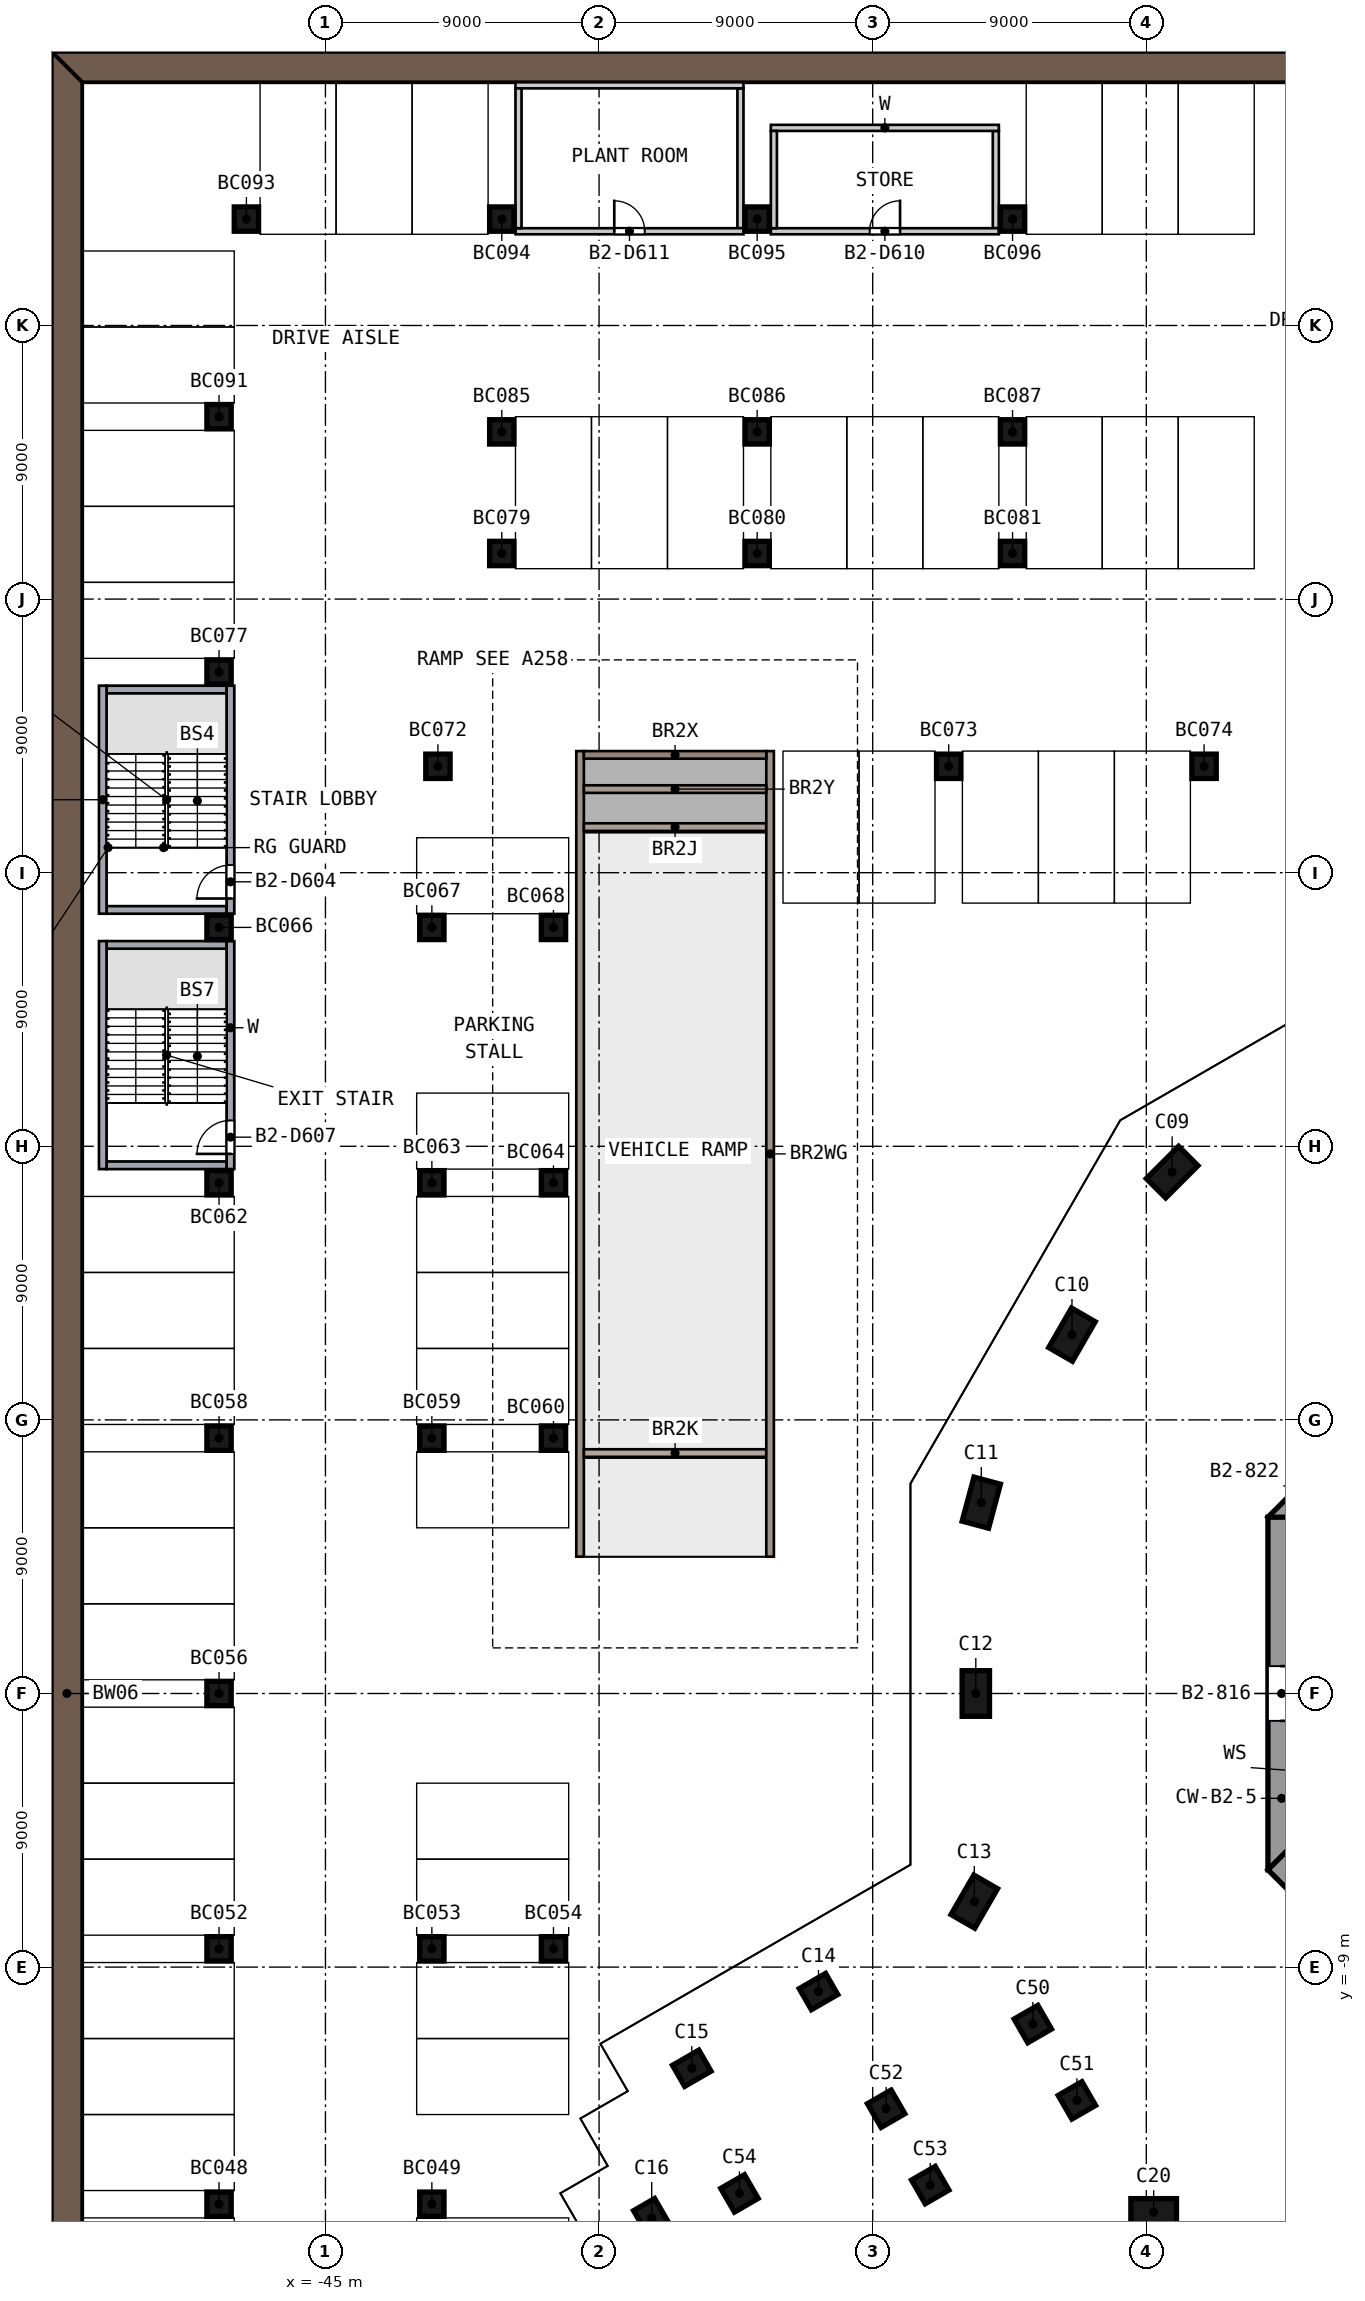
"""IFC4 building model, lengths in metres.
Left out: names, types, materials, properties, quantities, classifications, styles, units other than length and angle.
Written with IfcOpenShell. Run it as: python <this file> out.ifc"""

import sys

from ifc_helpers import new_model, si_unit, direction, frame, frame_2d, origin, origin_2d, place, context, subcontext, project, spatial, polyline, rectangle, outline, extrude, element, fill, save


model = new_model("IFC4")
c1 = context("Model", 3, precision=1e-05, world=origin(), true_north=direction((0.0, 1.0)))
c2 = subcontext(c1, "Body", "Model", "MODEL_VIEW")
j1 = project(units=[si_unit("LENGTHUNIT", "METRE"), si_unit("PLANEANGLEUNIT", "RADIAN")], contexts=[c1])
p1 = place(None, origin())
s1 = spatial("IfcSite", under=j1, at=p1, CompositionType="ELEMENT")
p2 = place(p1, origin())
s2 = spatial("IfcBuilding", under=s1, at=p2, CompositionType="ELEMENT")
p3 = place(p2, frame((0.0, 0.0, -7.8)))
s3 = spatial("IfcBuildingStorey", under=s2, at=p3, CompositionType="ELEMENT", Elevation=-7.8)
for number, where, z_axis, x_axis in (
    (1, (-17.151, 17.151, 0.0), (0.0, 0.0, 1.0), (0.707, 0.707, 0.0)),
    (2, (-20.445, 11.804, 0.0), (0.0, 0.0, 1.0), (-0.5, -0.866, 0.0)),
    (3, (-23.428, 6.278, 0.0), (0.0, 0.0, 1.0), (0.259, 0.966, 0.0)),
    (4, (-23.608, 0.0, 0.0), (0.0, 0.0, 1.0), (0.0, -1.0, 0.0)),
    (5, (-23.658, -6.846, 0.0), (0.0, 0.0, 1.0), (0.5, 0.866, 0.0)),
):
    element("IfcColumn", number, at=place(p3, frame(where, z_axis=z_axis, x_axis=x_axis)), inside=s3, PredefinedType="COLUMN", context=c2, shape_type="SweptSolid", body=[
        extrude(rectangle(XDim=1.5, YDim=0.9, at=origin_2d()), origin(), (0.0, 0.0, 1.0), 3.45),
    ])
for number, where, z_axis, x_axis in (
    (6, (-28.783, -9.805, 0.0), (0.0, 0.0, 1.0), (-0.866, -0.5, 0.0)),
    (7, (-32.951, -12.327, 0.0), (0.0, 0.0, 1.0), (-0.866, -0.5, 0.0)),
    (8, (-34.269, -17.245, 0.0), (0.0, 0.0, 1.0), (0.5, -0.866, 0.0)),
):
    element("IfcColumn", number, at=place(p3, frame(where, z_axis=z_axis, x_axis=x_axis)), inside=s3, PredefinedType="COLUMN", context=c2, shape_type="SweptSolid", body=[
        extrude(rectangle(XDim=1.0, YDim=0.8, at=origin_2d()), origin(), (0.0, 0.0, 1.0), 3.45),
    ])
p4 = place(p3, frame((-17.758, -17.065, 0.0), z_axis=(0.0, 0.0, 1.0), x_axis=(-1.0, 0.0, 0.0)))
e9 = element("IfcColumn", 9, at=p4, inside=s3, PredefinedType="COLUMN", context=c2, shape_type="SweptSolid", body=[
    extrude(rectangle(XDim=1.5, YDim=0.9, at=origin_2d()), origin(), (0.0, 0.0, 1.0), 3.45),
])
for number, where, z_axis, x_axis in (
    (10, (-21.733, -10.873, 0.0), (0.0, 0.0, 1.0), (-0.866, -0.5, 0.0)),
    (11, (-20.283, -13.385, 0.0), (0.0, 0.0, 1.0), (-0.866, -0.5, 0.0)),
    (12, (-26.558, -13.659, 0.0), (0.0, 0.0, 1.0), (-0.866, -0.5, 0.0)),
    (13, (-25.108, -16.17, 0.0), (0.0, 0.0, 1.0), (-0.866, -0.5, 0.0)),
    (14, (-31.382, -16.444, 0.0), (0.0, 0.0, 1.0), (-0.866, -0.5, 0.0)),
):
    element("IfcColumn", number, at=place(p3, frame(where, z_axis=z_axis, x_axis=x_axis)), inside=s3, PredefinedType="COLUMN", context=c2, shape_type="SweptSolid", body=[
        extrude(rectangle(XDim=0.9, YDim=0.9, at=origin_2d()), origin(), (0.0, 0.0, 1.0), 3.45),
    ])
p5 = place(p3, frame((-5.481, 13.682, 0.0), z_axis=(0.0, 0.0, 1.0), x_axis=(-0.707106781, -0.707106781, 0.0)))
e15 = element("IfcWall", 15, at=p5, inside=s3, PredefinedType="SHEAR", context=c2, shape_type="SweptSolid", body=[
    extrude(rectangle(XDim=11.598, YDim=0.9, at=frame_2d((5.799, 0.0))), origin(), (0.0, 0.0, 1.0), 3.9),
])
p6 = place(p3, frame((-13.55, 5.799, 0.0), z_axis=(0.0, 0.0, 1.0), x_axis=(0.0, -1.0, 0.0)))
e16 = element("IfcWall", 16, at=p6, inside=s3, PredefinedType="SHEAR", context=c2, shape_type="SweptSolid", body=[
    extrude(rectangle(XDim=11.598, YDim=0.9, at=frame_2d((5.799, 0.0))), origin(), (0.0, 0.0, 1.0), 3.9),
])
p7 = place(p6, frame((4.899, 0.0, 0.0)))
e17 = element("IfcOpeningElement", 17, at=p7, cuts=e16, PredefinedType="OPENING", context=c2, shape_type="SweptSolid", body=[
    extrude(rectangle(XDim=1.8, YDim=2.1, at=frame_2d((0.9, 1.05))), frame((0.0, 0.46, 0.0), z_axis=(0.0, -1.0, 0.0), x_axis=(1.0, 0.0, 0.0)), (0.0, 0.0, 1.0), 0.92),
])
p8 = place(p3, frame((-13.682, -5.481, 0.0), z_axis=(0.0, 0.0, 1.0), x_axis=(0.707106781, -0.707106781, 0.0)))
e18 = element("IfcWall", 18, at=p8, inside=s3, PredefinedType="SHEAR", context=c2, shape_type="SweptSolid", body=[
    extrude(rectangle(XDim=11.598, YDim=0.9, at=frame_2d((5.799, 0.0))), origin(), (0.0, 0.0, 1.0), 3.9),
])
p9 = place(p3, origin())
e19 = element("IfcWall", 19, at=p9, inside=s3, PredefinedType="SOLIDWALL", context=c2, shape_type="SweptSolid", body=[
    extrude(outline(polyline([(54.0, 54.0), (-54.0, 54.0), (-53.0, 53.0), (53.0, 53.0), (54.0, 54.0)])), origin(), (0.0, 0.0, 1.0), 3.9),
])
p10 = place(p3, origin())
e20 = element("IfcWall", 20, at=p10, inside=s3, PredefinedType="SOLIDWALL", context=c2, shape_type="SweptSolid", body=[
    extrude(outline(polyline([(-54.0, 54.0), (-54.0, -54.0), (-53.0, -53.0), (-53.0, 53.0), (-54.0, 54.0)])), origin(), (0.0, 0.0, 1.0), 3.9),
])
for number, where, z_axis, x_axis in (
    (21, (-48.5, -16.8, 0.0), (0.0, 0.0, 1.0), (1.0, 0.0, 0.0)),
    (22, (-41.5, -16.8, 0.0), (0.0, 0.0, 1.0), (1.0, 0.0, 0.0)),
    (23, (-48.5, -8.4, 0.0), (0.0, 0.0, 1.0), (1.0, 0.0, 0.0)),
    (24, (-41.5, -8.4, 0.0), (0.0, 0.0, 1.0), (1.0, 0.0, 0.0)),
    (25, (-37.5, -8.4, 0.0), (0.0, 0.0, 1.0), (1.0, 0.0, 0.0)),
    (26, (-48.5, 0.0, 0.0), (0.0, 0.0, 1.0), (1.0, 0.0, 0.0)),
    (27, (-48.5, 8.4, 0.0), (0.0, 0.0, 1.0), (1.0, 0.0, 0.0)),
    (28, (-41.5, 8.4, 0.0), (0.0, 0.0, 1.0), (1.0, 0.0, 0.0)),
    (29, (-37.5, 8.4, 0.0), (0.0, 0.0, 1.0), (1.0, 0.0, 0.0)),
    (30, (-48.5, 16.8, 0.0), (0.0, 0.0, 1.0), (1.0, 0.0, 0.0)),
    (31, (-41.5, 16.8, 0.0), (0.0, 0.0, 1.0), (1.0, 0.0, 0.0)),
    (32, (-37.5, 16.8, 0.0), (0.0, 0.0, 1.0), (1.0, 0.0, 0.0)),
    (33, (-48.5, 25.2, 0.0), (0.0, 0.0, 1.0), (1.0, 0.0, 0.0)),
    (34, (-41.5, 25.2, 0.0), (0.0, 0.0, 1.0), (1.0, 0.0, 0.0)),
    (35, (-37.5, 25.2, 0.0), (0.0, 0.0, 1.0), (1.0, 0.0, 0.0)),
    (36, (-41.3, 30.5, 0.0), (0.0, 0.0, 1.0), (1.0, 0.0, 0.0)),
    (37, (-24.5, 30.5, 0.0), (0.0, 0.0, 1.0), (1.0, 0.0, 0.0)),
    (38, (-16.1, 30.5, 0.0), (0.0, 0.0, 1.0), (1.0, 0.0, 0.0)),
    (39, (-48.5, 33.6, 0.0), (0.0, 0.0, 1.0), (1.0, 0.0, 0.0)),
    (40, (-39.2, 37.5, 0.0), (0.0, 0.0, 1.0), (1.0, 0.0, 0.0)),
    (41, (-30.8, 37.5, 0.0), (0.0, 0.0, 1.0), (1.0, 0.0, 0.0)),
    (42, (-22.4, 37.5, 0.0), (0.0, 0.0, 1.0), (1.0, 0.0, 0.0)),
    (43, (-39.2, 41.5, 0.0), (0.0, 0.0, 1.0), (1.0, 0.0, 0.0)),
    (44, (-30.8, 41.5, 0.0), (0.0, 0.0, 1.0), (1.0, 0.0, 0.0)),
    (45, (-22.4, 41.5, 0.0), (0.0, 0.0, 1.0), (1.0, 0.0, 0.0)),
    (46, (-48.5, 42.0, 0.0), (0.0, 0.0, 1.0), (1.0, 0.0, 0.0)),
    (47, (-47.6, 48.5, 0.0), (0.0, 0.0, 1.0), (1.0, 0.0, 0.0)),
    (48, (-39.2, 48.5, 0.0), (0.0, 0.0, 1.0), (1.0, 0.0, 0.0)),
    (49, (-30.8, 48.5, 0.0), (0.0, 0.0, 1.0), (1.0, 0.0, 0.0)),
    (50, (-22.4, 48.5, 0.0), (0.0, 0.0, 1.0), (1.0, 0.0, 0.0)),
):
    element("IfcColumn", number, at=place(p3, frame(where, z_axis=z_axis, x_axis=x_axis)), inside=s3, PredefinedType="COLUMN", context=c2, shape_type="SweptSolid", body=[
        extrude(rectangle(XDim=0.8, YDim=0.8, at=origin_2d()), origin(), (0.0, 0.0, 1.0), 3.9),
    ])
for number, where, z_axis, x_axis in (
    (51, (-30.375, 31.0, 0.0), (0.0, 0.0, 1.0), (0.0, -1.0, 0.0)),
    (52, (-36.625, 31.0, 0.0), (0.0, 0.0, 1.0), (0.0, -1.0, 0.0)),
):
    element("IfcWall", number, at=place(p3, frame(where, z_axis=z_axis, x_axis=x_axis)), inside=s3, PredefinedType="SOLIDWALL", context=c2, shape_type="SweptSolid", body=[
        extrude(rectangle(XDim=26.5, YDim=0.25, at=frame_2d((13.25, 0.0))), origin(), (0.0, 0.0, 1.0), 5.02),
    ])
p11 = place(p3, frame((-30.5, 30.875, 0.0), z_axis=(0.0, 0.0, 1.0), x_axis=(-1.0, 0.0, 0.0)))
e53 = element("IfcWall", 53, at=p11, inside=s3, PredefinedType="SOLIDWALL", context=c2, shape_type="SweptSolid", body=[
    extrude(rectangle(XDim=6.0, YDim=0.25, at=frame_2d((3.0, 0.0))), origin(), (0.0, 0.0, 1.0), 3.55),
])
p12 = place(p3, frame((-30.5, 28.5, 0.0), z_axis=(0.0, 0.0, 1.0), x_axis=(-1.0, 0.0, 0.0)))
e54 = element("IfcWall", 54, at=p12, inside=s3, PredefinedType="SOLIDWALL", context=c2, shape_type="SweptSolid", body=[
    extrude(rectangle(XDim=6.0, YDim=0.25, at=frame_2d((3.0, 0.0))), origin(), (0.0, 0.0, 1.0), 3.734),
])
p13 = place(p3, frame((-30.5, 7.909, 0.0), z_axis=(0.0, 0.0, 1.0), x_axis=(-1.0, 0.0, 0.0)))
e55 = element("IfcWall", 55, at=p13, inside=s3, PredefinedType="SOLIDWALL", context=c2, shape_type="SweptSolid", body=[
    extrude(rectangle(XDim=6.0, YDim=0.25, at=frame_2d((3.0, 0.0))), origin(), (0.0, 0.0, 1.0), 0.395),
])
p14 = place(p3, frame((-30.5, 29.75, 0.0), z_axis=(0.0, 0.0, 1.0), x_axis=(-1.0, 0.0, 0.0)))
e56 = element("IfcWall", 56, at=p14, inside=s3, PredefinedType="SOLIDWALL", context=c2, shape_type="SweptSolid", body=[
    extrude(rectangle(XDim=6.0, YDim=0.25, at=frame_2d((3.0, 0.0))), origin(), (0.0, 0.0, 1.0), 3.471),
])
p15 = place(p3, frame((-52.325, 25.65, 0.0), z_axis=(0.0, 0.0, 1.0), x_axis=(0.0, 1.0, 0.0)))
e57 = element("IfcWall", 57, at=p15, inside=s3, PredefinedType="SOLIDWALL", context=c2, shape_type="SweptSolid", body=[
    extrude(rectangle(XDim=7.5, YDim=0.25, at=frame_2d((3.75, 0.0))), origin(), (0.0, 0.0, 1.0), 3.9),
])
p16 = place(p3, frame((-48.125, 25.65, 0.0), z_axis=(0.0, 0.0, 1.0), x_axis=(0.0, 1.0, 0.0)))
e58 = element("IfcWall", 58, at=p16, inside=s3, PredefinedType="SOLIDWALL", context=c2, shape_type="SweptSolid", body=[
    extrude(rectangle(XDim=7.5, YDim=0.25, at=frame_2d((3.75, 0.0))), origin(), (0.0, 0.0, 1.0), 3.9),
])
p17 = place(p16, frame((0.5, 0.0, 0.0)))
e59 = element("IfcOpeningElement", 59, at=p17, cuts=e58, PredefinedType="OPENING", context=c2, shape_type="SweptSolid", body=[
    extrude(rectangle(XDim=1.1, YDim=2.1, at=frame_2d((0.55, 1.05))), frame((0.0, 0.135, 0.0), z_axis=(0.0, -1.0, 0.0), x_axis=(1.0, 0.0, 0.0)), (0.0, 0.0, 1.0), 0.27),
])
for number, where, z_axis, x_axis in (
    (60, (-48.25, 25.775, 0.0), (0.0, 0.0, 1.0), (-1.0, 0.0, 0.0)),
    (61, (-48.25, 33.025, 0.0), (0.0, 0.0, 1.0), (-1.0, 0.0, 0.0)),
):
    element("IfcWall", number, at=place(p3, frame(where, z_axis=z_axis, x_axis=x_axis)), inside=s3, PredefinedType="SOLIDWALL", context=c2, shape_type="SweptSolid", body=[
        extrude(rectangle(XDim=3.95, YDim=0.25, at=frame_2d((1.975, 0.0))), origin(), (0.0, 0.0, 1.0), 3.9),
    ])
p18 = place(p3, frame((-52.325, 17.25, 0.0), z_axis=(0.0, 0.0, 1.0), x_axis=(0.0, 1.0, 0.0)))
e62 = element("IfcWall", 62, at=p18, inside=s3, PredefinedType="SOLIDWALL", context=c2, shape_type="SweptSolid", body=[
    extrude(rectangle(XDim=7.5, YDim=0.25, at=frame_2d((3.75, 0.0))), origin(), (0.0, 0.0, 1.0), 3.9),
])
p19 = place(p3, frame((-48.125, 17.25, 0.0), z_axis=(0.0, 0.0, 1.0), x_axis=(0.0, 1.0, 0.0)))
e63 = element("IfcWall", 63, at=p19, inside=s3, PredefinedType="SOLIDWALL", context=c2, shape_type="SweptSolid", body=[
    extrude(rectangle(XDim=7.5, YDim=0.25, at=frame_2d((3.75, 0.0))), origin(), (0.0, 0.0, 1.0), 3.9),
])
p20 = place(p19, frame((0.5, 0.0, 0.0)))
e64 = element("IfcOpeningElement", 64, at=p20, cuts=e63, PredefinedType="OPENING", context=c2, shape_type="SweptSolid", body=[
    extrude(rectangle(XDim=1.1, YDim=2.1, at=frame_2d((0.55, 1.05))), frame((0.0, 0.135, 0.0), z_axis=(0.0, -1.0, 0.0), x_axis=(1.0, 0.0, 0.0)), (0.0, 0.0, 1.0), 0.27),
])
for number, where, z_axis, x_axis in (
    (65, (-48.25, 17.375, 0.0), (0.0, 0.0, 1.0), (-1.0, 0.0, 0.0)),
    (66, (-48.25, 24.625, 0.0), (0.0, 0.0, 1.0), (-1.0, 0.0, 0.0)),
):
    element("IfcWall", number, at=place(p3, frame(where, z_axis=z_axis, x_axis=x_axis)), inside=s3, PredefinedType="SOLIDWALL", context=c2, shape_type="SweptSolid", body=[
        extrude(rectangle(XDim=3.95, YDim=0.25, at=frame_2d((1.975, 0.0))), origin(), (0.0, 0.0, 1.0), 3.9),
    ])
p21 = place(p3, frame((-30.35, 48.1, 0.0), z_axis=(0.0, 0.0, 1.0), x_axis=(1.0, 0.0, 0.0)))
e67 = element("IfcWall", 67, at=p21, inside=s3, PredefinedType="PARTITIONING", context=c2, shape_type="SweptSolid", body=[
    extrude(rectangle(XDim=7.5, YDim=0.2, at=frame_2d((3.75, 0.0))), origin(), (0.0, 0.0, 1.0), 3.45),
])
p22 = place(p21, frame((3.25, 0.0, 0.0)))
e68 = element("IfcOpeningElement", 68, at=p22, cuts=e67, PredefinedType="OPENING", context=c2, shape_type="SweptSolid", body=[
    extrude(rectangle(XDim=1.0, YDim=2.1, at=frame_2d((0.5, 1.05))), frame((0.0, 0.11, 0.0), z_axis=(0.0, -1.0, 0.0), x_axis=(1.0, 0.0, 0.0)), (0.0, 0.0, 1.0), 0.22),
])
p23 = place(p3, frame((-30.35, 51.5, 0.0), z_axis=(0.0, 0.0, 1.0), x_axis=(1.0, 0.0, 0.0)))
e69 = element("IfcWall", 69, at=p23, inside=s3, PredefinedType="PARTITIONING", context=c2, shape_type="SweptSolid", body=[
    extrude(rectangle(XDim=7.5, YDim=0.2, at=frame_2d((3.75, 0.0))), origin(), (0.0, 0.0, 1.0), 3.45),
])
for number, where, z_axis, x_axis in (
    (70, (-30.25, 48.2, 0.0), (0.0, 0.0, 1.0), (0.0, 1.0, 0.0)),
    (71, (-22.95, 48.2, 0.0), (0.0, 0.0, 1.0), (0.0, 1.0, 0.0)),
):
    element("IfcWall", number, at=place(p3, frame(where, z_axis=z_axis, x_axis=x_axis)), inside=s3, PredefinedType="PARTITIONING", context=c2, shape_type="SweptSolid", body=[
        extrude(rectangle(XDim=3.2, YDim=0.2, at=frame_2d((1.6, 0.0))), origin(), (0.0, 0.0, 1.0), 3.45),
    ])
p24 = place(p3, frame((-38.75, 48.1, 0.0), z_axis=(0.0, 0.0, 1.0), x_axis=(1.0, 0.0, 0.0)))
e72 = element("IfcWall", 72, at=p24, inside=s3, PredefinedType="PARTITIONING", context=c2, shape_type="SweptSolid", body=[
    extrude(rectangle(XDim=7.5, YDim=0.2, at=frame_2d((3.75, 0.0))), origin(), (0.0, 0.0, 1.0), 3.45),
])
p25 = place(p24, frame((3.25, 0.0, 0.0)))
e73 = element("IfcOpeningElement", 73, at=p25, cuts=e72, PredefinedType="OPENING", context=c2, shape_type="SweptSolid", body=[
    extrude(rectangle(XDim=1.0, YDim=2.1, at=frame_2d((0.5, 1.05))), frame((0.0, 0.11, 0.0), z_axis=(0.0, -1.0, 0.0), x_axis=(1.0, 0.0, 0.0)), (0.0, 0.0, 1.0), 0.22),
])
p26 = place(p3, frame((-38.75, 52.9, 0.0), z_axis=(0.0, 0.0, 1.0), x_axis=(1.0, 0.0, 0.0)))
e74 = element("IfcWall", 74, at=p26, inside=s3, PredefinedType="PARTITIONING", context=c2, shape_type="SweptSolid", body=[
    extrude(rectangle(XDim=7.5, YDim=0.2, at=frame_2d((3.75, 0.0))), origin(), (0.0, 0.0, 1.0), 3.45),
])
for number, where, z_axis, x_axis in (
    (75, (-38.65, 48.2, 0.0), (0.0, 0.0, 1.0), (0.0, 1.0, 0.0)),
    (76, (-31.35, 48.2, 0.0), (0.0, 0.0, 1.0), (0.0, 1.0, 0.0)),
):
    element("IfcWall", number, at=place(p3, frame(where, z_axis=z_axis, x_axis=x_axis)), inside=s3, PredefinedType="PARTITIONING", context=c2, shape_type="SweptSolid", body=[
        extrude(rectangle(XDim=4.6, YDim=0.2, at=frame_2d((2.3, 0.0))), origin(), (0.0, 0.0, 1.0), 3.45),
    ])
p27 = place(p7, origin())
e77 = element("IfcDoor", 77, at=p27, inside=s3, OperationType="DOUBLE_DOOR_SINGLE_SWING", PredefinedType="DOOR", context=c2, shape_type="SweptSolid", body=[
    extrude(rectangle(XDim=1.8, YDim=2.1, at=frame_2d((0.9, 1.05))), frame((0.0, 0.025, 0.0), z_axis=(0.0, -1.0, 0.0), x_axis=(1.0, 0.0, 0.0)), (0.0, 0.0, 1.0), 0.05),
])
fill(e17, e77)
p28 = place(p17, origin())
e78 = element("IfcDoor", 78, at=p28, inside=s3, OperationType="SINGLE_SWING_LEFT", PredefinedType="DOOR", context=c2, shape_type="SweptSolid", body=[
    extrude(rectangle(XDim=1.1, YDim=2.1, at=frame_2d((0.55, 1.05))), frame((0.0, 0.025, 0.0), z_axis=(0.0, -1.0, 0.0), x_axis=(1.0, 0.0, 0.0)), (0.0, 0.0, 1.0), 0.05),
])
fill(e59, e78)
p29 = place(p20, origin())
e79 = element("IfcDoor", 79, at=p29, inside=s3, OperationType="SINGLE_SWING_LEFT", PredefinedType="DOOR", context=c2, shape_type="SweptSolid", body=[
    extrude(rectangle(XDim=1.1, YDim=2.1, at=frame_2d((0.55, 1.05))), frame((0.0, 0.025, 0.0), z_axis=(0.0, -1.0, 0.0), x_axis=(1.0, 0.0, 0.0)), (0.0, 0.0, 1.0), 0.05),
])
fill(e64, e79)
p30 = place(p22, origin())
e80 = element("IfcDoor", 80, at=p30, inside=s3, OperationType="SINGLE_SWING_RIGHT", PredefinedType="DOOR", context=c2, shape_type="SweptSolid", body=[
    extrude(rectangle(XDim=1.0, YDim=2.1, at=frame_2d((0.5, 1.05))), frame((0.0, 0.025, 0.0), z_axis=(0.0, -1.0, 0.0), x_axis=(1.0, 0.0, 0.0)), (0.0, 0.0, 1.0), 0.05),
])
fill(e68, e80)
p31 = place(p25, origin())
e81 = element("IfcDoor", 81, at=p31, inside=s3, OperationType="SINGLE_SWING_LEFT", PredefinedType="DOOR", context=c2, shape_type="SweptSolid", body=[
    extrude(rectangle(XDim=1.0, YDim=2.1, at=frame_2d((0.5, 1.05))), frame((0.0, 0.025, 0.0), z_axis=(0.0, -1.0, 0.0), x_axis=(1.0, 0.0, 0.0)), (0.0, 0.0, 1.0), 0.05),
])
fill(e73, e81)
save(model, sys.argv[1])
